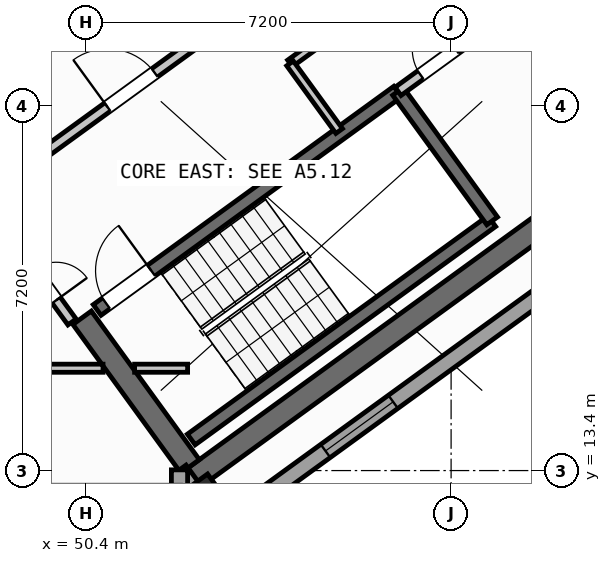
"""IFC4 building model, lengths in metres.
Left out: names, types, materials, properties, quantities, classifications, styles, units other than length and angle.
Written with IfcOpenShell. Run it as: python <this file> out.ifc"""

import sys

from ifc_helpers import new_model, si_unit, direction, frame, frame_2d, origin, origin_2d, place, context, subcontext, project, spatial, rectangle, hollow_rectangle, extrude, source, transform, mapped, element, fill, save


model = new_model("IFC4")
c1 = context("Model", 3, precision=1e-05, world=origin(), true_north=direction((0.0, 1.0)))
c2 = subcontext(c1, "Body", "Model", "MODEL_VIEW")
j1 = project(units=[si_unit("LENGTHUNIT", "METRE"), si_unit("PLANEANGLEUNIT", "RADIAN")], contexts=[c1])
p1 = place(None, origin())
s1 = spatial("IfcSite", under=j1, at=p1, CompositionType="ELEMENT")
p2 = place(p1, origin())
s2 = spatial("IfcBuilding", under=s1, at=p2, CompositionType="ELEMENT")
p3 = place(p2, frame((0.0, 0.0, 222.0)))
s3 = spatial("IfcBuildingStorey", under=s2, at=p3, CompositionType="ELEMENT", Elevation=222.0)
p4 = place(p3, frame((52.399, 13.169, 0.0), z_axis=(0.0, 0.0, 1.0), x_axis=(0.809022352778, 0.587777877013, 0.0)))
e1 = element("IfcWall", 1, at=p4, inside=s3, PredefinedType="SHEAR", context=c2, shape_type="SweptSolid", body=[
    extrude(rectangle(XDim=12.24, YDim=0.45, at=frame_2d((6.12, 0.0))), origin(), (0.0, 0.0, 1.0), 3.35),
])
p5 = place(p3, frame((52.449, 13.483, 0.0), z_axis=(0.0, 0.0, 1.0), x_axis=(-0.587819244441, 0.808992296542, 0.0)))
e2 = element("IfcWall", 2, at=p5, inside=s3, PredefinedType="SHEAR", context=c2, shape_type="SweptSolid", body=[
    extrude(rectangle(XDim=3.625, YDim=0.45, at=frame_2d((1.812, 0.0))), origin(), (0.0, 0.0, 1.0), 3.35),
])
m1 = source(origin(), c2, "Body", "SweptSolid", [
    extrude(hollow_rectangle(XDim=0.8, YDim=0.8, WallThickness=0.032, at=origin_2d()), origin(), (0.0, 0.0, 1.0), 3.6),
])
p6 = place(p3, frame((52.705, 12.773, 0.0), z_axis=(0.0, 0.0, 1.0), x_axis=(0.809016994375, 0.587785252292, 0.0)))
e3 = element("IfcColumn", 3, at=p6, inside=s3, PredefinedType="COLUMN", context=c2, shape_type="MappedRepresentation", body=[
    mapped(m1, transform((0.0, 0.0, 0.0), scale=1.0)),
])
p7 = place(p3, frame((67.454, 22.747, 0.0), z_axis=(0.0, 0.0, 1.0), x_axis=(-0.809021120468, -0.587779573171, 0.0)))
e4 = element("IfcWall", 4, at=p7, inside=s3, PredefinedType="STANDARD", context=c2, shape_type="SweptSolid", body=[
    extrude(rectangle(XDim=17.588, YDim=0.32, at=frame_2d((8.794, 0.0))), origin(), (0.0, 0.0, 1.0), 3.35),
])
p8 = place(p7, frame((1.624, 0.0, 0.0)))
e5 = element("IfcOpeningElement", 5, at=p8, cuts=e4, PredefinedType="OPENING", context=c2, shape_type="SweptSolid", body=[
    extrude(rectangle(XDim=1.05, YDim=2.15, at=frame_2d((0.525, 1.075))), frame((0.0, 0.17, 0.0), z_axis=(0.0, -1.0, 0.0), x_axis=(1.0, 0.0, 0.0)), (0.0, 0.0, 1.0), 0.34),
])
p9 = place(p7, frame((8.344, 0.0, 0.9)))
e6 = element("IfcOpeningElement", 6, at=p9, cuts=e4, PredefinedType="OPENING", context=c2, shape_type="SweptSolid", body=[
    extrude(rectangle(XDim=1.65, YDim=1.45, at=frame_2d((0.825, 0.725))), frame((0.0, 0.17, 0.0), z_axis=(0.0, -1.0, 0.0), x_axis=(1.0, 0.0, 0.0)), (0.0, 0.0, 1.0), 0.34),
])
p10 = place(p7, frame((13.594, 0.0, 0.9)))
e7 = element("IfcOpeningElement", 7, at=p10, cuts=e4, PredefinedType="OPENING", context=c2, shape_type="SweptSolid", body=[
    extrude(rectangle(XDim=1.65, YDim=1.45, at=frame_2d((0.825, 0.725))), frame((0.0, 0.17, 0.0), z_axis=(0.0, -1.0, 0.0), x_axis=(1.0, 0.0, 0.0)), (0.0, 0.0, 1.0), 0.34),
])
p11 = place(p3, frame((52.937, 12.455, 0.0), z_axis=(0.0, 0.0, 1.0), x_axis=(-0.587706324018, 0.809074333241, 0.0)))
e8 = element("IfcWall", 8, at=p11, inside=s3, PredefinedType="STANDARD", context=c2, shape_type="SweptSolid", body=[
    extrude(rectangle(XDim=1.186, YDim=0.32, at=frame_2d((0.593, 0.0))), origin(), (0.0, 0.0, 1.0), 3.35),
])
p12 = place(p3, frame((52.24, 13.414, 0.0), z_axis=(0.0, 0.0, 1.0), x_axis=(0.0, -1.0, 0.0)))
e9 = element("IfcWall", 9, at=p12, inside=s3, PredefinedType="STANDARD", context=c2, shape_type="SweptSolid", body=[
    extrude(rectangle(XDim=9.948, YDim=0.32, at=frame_2d((4.974, 0.0))), origin(), (0.0, 0.0, 1.0), 3.35),
])
p13 = place(p12, frame((2.643, 0.0, 0.9)))
e10 = element("IfcOpeningElement", 10, at=p13, cuts=e9, PredefinedType="OPENING", context=c2, shape_type="SweptSolid", body=[
    extrude(rectangle(XDim=1.65, YDim=1.45, at=frame_2d((0.825, 0.725))), frame((0.0, 0.17, 0.0), z_axis=(0.0, -1.0, 0.0), x_axis=(1.0, 0.0, 0.0)), (0.0, 0.0, 1.0), 0.34),
])
p14 = place(p12, frame((7.408, 0.0, 0.9)))
e11 = element("IfcOpeningElement", 11, at=p14, cuts=e9, PredefinedType="OPENING", context=c2, shape_type="SweptSolid", body=[
    extrude(rectangle(XDim=1.35, YDim=1.45, at=frame_2d((0.675, 0.725))), frame((0.0, 0.17, 0.0), z_axis=(0.0, -1.0, 0.0), x_axis=(1.0, 0.0, 0.0)), (0.0, 0.0, 1.0), 0.34),
])
p15 = place(p3, frame((52.472, 14.013, 0.0), z_axis=(0.0, 0.0, 1.0), x_axis=(0.809028366311, 0.587769599847, 0.0)))
e12 = element("IfcWall", 12, at=p15, inside=s3, PredefinedType="SHEAR", context=c2, shape_type="SweptSolid", body=[
    extrude(rectangle(XDim=7.33, YDim=0.26, at=frame_2d((3.665, 0.0))), origin(), (0.0, 0.0, 1.0), 3.35),
])
p16 = place(p3, frame((50.615, 16.57, 0.0), z_axis=(0.0, 0.0, 1.0), x_axis=(0.809028366311, 0.587769599847, 0.0)))
e13 = element("IfcWall", 13, at=p16, inside=s3, PredefinedType="SHEAR", context=c2, shape_type="SweptSolid", body=[
    extrude(rectangle(XDim=7.33, YDim=0.26, at=frame_2d((3.665, 0.0))), origin(), (0.0, 0.0, 1.0), 3.35),
])
p17 = place(p16, frame((0.22, 0.0, 0.0)))
e14 = element("IfcOpeningElement", 14, at=p17, cuts=e13, PredefinedType="OPENING", context=c2, shape_type="SweptSolid", body=[
    extrude(rectangle(XDim=1.1, YDim=2.1, at=frame_2d((0.55, 1.05))), frame((0.0, 0.14, 0.0), z_axis=(0.0, -1.0, 0.0), x_axis=(1.0, 0.0, 0.0)), (0.0, 0.0, 1.0), 0.28),
])
p18 = place(p3, frame((58.41, 18.327, 0.0), z_axis=(0.0, 0.0, 1.0), x_axis=(-0.58776738483, 0.809029975545, 0.0)))
e15 = element("IfcWall", 15, at=p18, inside=s3, PredefinedType="SHEAR", context=c2, shape_type="SweptSolid", body=[
    extrude(rectangle(XDim=3.16, YDim=0.26, at=frame_2d((1.58, 0.0))), origin(), (0.0, 0.0, 1.0), 3.35),
])
p19 = place(p3, frame((47.025, 21.378, 0.0), z_axis=(0.0, 0.0, 1.0), x_axis=(0.809052869724, 0.587735870941, 0.0)))
e16 = element("IfcWall", 16, at=p19, inside=s3, PredefinedType="STANDARD", context=c2, shape_type="SweptSolid", body=[
    extrude(rectangle(XDim=3.498, YDim=0.2, at=frame_2d((1.749, 0.0))), origin(), (0.0, 0.0, 1.0), 3.34),
])
p20 = place(p19, frame((0.508, 0.0, 0.0)))
e17 = element("IfcOpeningElement", 17, at=p20, cuts=e16, PredefinedType="OPENING", context=c2, shape_type="SweptSolid", body=[
    extrude(rectangle(XDim=1.3, YDim=2.2, at=frame_2d((0.65, 1.1))), frame((0.0, 0.11, 0.0), z_axis=(0.0, -1.0, 0.0), x_axis=(1.0, 0.0, 0.0)), (0.0, 0.0, 1.0), 0.22),
])
p21 = place(p3, frame((48.718, 19.048, 0.0), z_axis=(0.0, 0.0, 1.0), x_axis=(0.809017261719, 0.587784884325, 0.0)))
e18 = element("IfcWall", 18, at=p21, inside=s3, PredefinedType="STANDARD", context=c2, shape_type="SweptSolid", body=[
    extrude(rectangle(XDim=5.818, YDim=0.2, at=frame_2d((2.909, 0.0))), origin(), (0.0, 0.0, 1.0), 3.34),
])
p22 = place(p21, frame((2.598, 0.0, 0.0)))
e19 = element("IfcOpeningElement", 19, at=p22, cuts=e18, PredefinedType="OPENING", context=c2, shape_type="SweptSolid", body=[
    extrude(rectangle(XDim=1.15, YDim=2.1, at=frame_2d((0.575, 1.05))), frame((0.0, 0.11, 0.0), z_axis=(0.0, -1.0, 0.0), x_axis=(1.0, 0.0, 0.0)), (0.0, 0.0, 1.0), 0.22),
])
p23 = place(p3, frame((56.553, 20.884, 0.0), z_axis=(0.0, 0.0, 1.0), x_axis=(0.809041669066, 0.587751288995, 0.0)))
e20 = element("IfcWall", 20, at=p23, inside=s3, PredefinedType="STANDARD", context=c2, shape_type="SweptSolid", body=[
    extrude(rectangle(XDim=3.868, YDim=0.2, at=frame_2d((1.934, 0.0))), origin(), (0.0, 0.0, 1.0), 3.34),
])
p24 = place(p23, frame((0.55, 0.0, 0.0)))
e21 = element("IfcOpeningElement", 21, at=p24, cuts=e20, PredefinedType="OPENING", context=c2, shape_type="SweptSolid", body=[
    extrude(rectangle(XDim=0.86, YDim=2.05, at=frame_2d((0.43, 1.025))), frame((0.0, 0.11, 0.0), z_axis=(0.0, -1.0, 0.0), x_axis=(1.0, 0.0, 0.0)), (0.0, 0.0, 1.0), 0.22),
])
p25 = place(p3, frame((54.421, 21.436, 0.0), z_axis=(0.0, 0.0, 1.0), x_axis=(0.809013710463, 0.587789772183, 0.0)))
e22 = element("IfcWall", 22, at=p25, inside=s3, PredefinedType="PARTITIONING", context=c2, shape_type="SweptSolid", body=[
    extrude(rectangle(XDim=5.36, YDim=0.16, at=frame_2d((2.68, 0.0))), origin(), (0.0, 0.0, 1.0), 3.34),
])
p26 = place(p25, frame((1.4, 0.0, 0.0)))
e23 = element("IfcOpeningElement", 23, at=p26, cuts=e22, PredefinedType="OPENING", context=c2, shape_type="SweptSolid", body=[
    extrude(rectangle(XDim=0.86, YDim=2.05, at=frame_2d((0.43, 1.025))), frame((0.0, 0.09, 0.0), z_axis=(0.0, -1.0, 0.0), x_axis=(1.0, 0.0, 0.0)), (0.0, 0.0, 1.0), 0.18),
])
p27 = place(p3, frame((55.391, 20.102, 0.0), z_axis=(0.0, 0.0, 1.0), x_axis=(-0.58778447739, 0.809017557374, 0.0)))
e24 = element("IfcWall", 24, at=p27, inside=s3, PredefinedType="PARTITIONING", context=c2, shape_type="SweptSolid", body=[
    extrude(rectangle(XDim=1.65, YDim=0.16, at=frame_2d((0.825, 0.0))), origin(), (0.0, 0.0, 1.0), 3.34),
])
p28 = place(p3, frame((35.178, 15.42, 0.0), z_axis=(0.0, 0.0, 1.0), x_axis=(1.0, 0.0, 0.0)))
e25 = element("IfcWall", 25, at=p28, inside=s3, PredefinedType="PARTITIONING", context=c2, shape_type="SweptSolid", body=[
    extrude(rectangle(XDim=15.552, YDim=0.16, at=frame_2d((7.776, 0.0))), origin(), (0.0, 0.0, 1.0), 3.34),
])
p29 = place(p28, frame((0.733, 0.0, 0.0)))
e26 = element("IfcOpeningElement", 26, at=p29, cuts=e25, PredefinedType="OPENING", context=c2, shape_type="SweptSolid", body=[
    extrude(rectangle(XDim=1.0, YDim=2.1, at=frame_2d((0.5, 1.05))), frame((0.0, 0.09, 0.0), z_axis=(0.0, -1.0, 0.0), x_axis=(1.0, 0.0, 0.0)), (0.0, 0.0, 1.0), 0.18),
])
p30 = place(p28, frame((9.153, 0.0, 0.0)))
e27 = element("IfcOpeningElement", 27, at=p30, cuts=e25, PredefinedType="OPENING", context=c2, shape_type="SweptSolid", body=[
    extrude(rectangle(XDim=1.0, YDim=2.1, at=frame_2d((0.5, 1.05))), frame((0.0, 0.09, 0.0), z_axis=(0.0, -1.0, 0.0), x_axis=(1.0, 0.0, 0.0)), (0.0, 0.0, 1.0), 0.18),
])
p31 = place(p3, frame((51.354, 15.42, 0.0), z_axis=(0.0, 0.0, 1.0), x_axis=(1.0, 0.0, 0.0)))
e28 = element("IfcWall", 28, at=p31, inside=s3, PredefinedType="PARTITIONING", context=c2, shape_type="SweptSolid", body=[
    extrude(rectangle(XDim=1.046, YDim=0.16, at=frame_2d((0.523, 0.0))), origin(), (0.0, 0.0, 1.0), 3.34),
])
p32 = place(p3, frame((50.119, 16.333, 0.0), z_axis=(0.0, 0.0, 1.0), x_axis=(-0.587749856981, 0.809042709391, 0.0)))
e29 = element("IfcWall", 29, at=p32, inside=s3, PredefinedType="STANDARD", context=c2, shape_type="SweptSolid", body=[
    extrude(rectangle(XDim=2.96, YDim=0.2, at=frame_2d((1.48, 0.0))), origin(), (0.0, 0.0, 1.0), 3.34),
])
p33 = place(p32, frame((0.53, 0.0, 0.0)))
e30 = element("IfcOpeningElement", 30, at=p33, cuts=e29, PredefinedType="OPENING", context=c2, shape_type="SweptSolid", body=[
    extrude(rectangle(XDim=1.5, YDim=2.15, at=frame_2d((0.75, 1.075))), frame((0.0, 0.11, 0.0), z_axis=(0.0, -1.0, 0.0), x_axis=(1.0, 0.0, 0.0)), (0.0, 0.0, 1.0), 0.22),
])
p34 = place(p3, frame((64.709, 20.938, 0.0), z_axis=(0.0, 0.0, 1.0), x_axis=(-0.587781191743, 0.809019944521, 0.0)))
e31 = element("IfcWall", 31, at=p34, inside=s3, PredefinedType="PARTITIONING", context=c2, shape_type="SweptSolid", body=[
    extrude(rectangle(XDim=11.6, YDim=0.16, at=frame_2d((5.8, 0.0))), origin(), (0.0, 0.0, 1.0), 3.34),
])
m2 = source(origin(), c2, "Body", "SweptSolid", [
    extrude(rectangle(XDim=1.65, YDim=1.45, at=frame_2d((0.825, 0.725))), frame((0.0, 0.03, 0.0), z_axis=(0.0, -1.0, 0.0), x_axis=(1.0, 0.0, 0.0)), (0.0, 0.0, 1.0), 0.06),
])
p35 = place(p10, origin())
e32 = element("IfcWindow", 32, at=p35, inside=s3, PartitioningType="SINGLE_PANEL", PredefinedType="WINDOW", context=c2, shape_type="MappedRepresentation", body=[
    mapped(m2, transform((0.0, 0.0, 0.0), scale=1.0)),
])
fill(e7, e32)
m3 = source(origin(), c2, "Body", "SweptSolid", [
    extrude(rectangle(XDim=1.1, YDim=2.1, at=frame_2d((0.55, 1.05))), frame((0.0, 0.025, 0.0), z_axis=(0.0, -1.0, 0.0), x_axis=(1.0, 0.0, 0.0)), (0.0, 0.0, 1.0), 0.05),
])
p36 = place(p17, origin())
e33 = element("IfcDoor", 33, at=p36, inside=s3, OperationType="SINGLE_SWING_RIGHT", PredefinedType="DOOR", context=c2, shape_type="MappedRepresentation", body=[
    mapped(m3, transform((0.0, 0.0, 0.0), scale=1.0)),
])
fill(e14, e33)
m4 = source(origin(), c2, "Body", "SweptSolid", [
    extrude(rectangle(XDim=1.15, YDim=2.1, at=frame_2d((0.575, 1.05))), frame((0.0, 0.025, 0.0), z_axis=(0.0, -1.0, 0.0), x_axis=(1.0, 0.0, 0.0)), (0.0, 0.0, 1.0), 0.05),
])
p37 = place(p22, origin())
e34 = element("IfcDoor", 34, at=p37, inside=s3, OperationType="SINGLE_SWING_LEFT", PredefinedType="DOOR", context=c2, shape_type="MappedRepresentation", body=[
    mapped(m4, transform((0.0, 0.0, 0.0), scale=1.0)),
])
fill(e19, e34)
m5 = source(origin(), c2, "Body", "SweptSolid", [
    extrude(rectangle(XDim=0.86, YDim=2.05, at=frame_2d((0.43, 1.025))), frame((0.0, 0.025, 0.0), z_axis=(0.0, -1.0, 0.0), x_axis=(1.0, 0.0, 0.0)), (0.0, 0.0, 1.0), 0.05),
])
p38 = place(p24, origin())
e35 = element("IfcDoor", 35, at=p38, inside=s3, OperationType="SINGLE_SWING_RIGHT", PredefinedType="DOOR", context=c2, shape_type="MappedRepresentation", body=[
    mapped(m5, transform((0.0, 0.0, 0.0), scale=1.0)),
])
fill(e21, e35)
m6 = source(origin(), c2, "Body", "SweptSolid", [
    extrude(rectangle(XDim=1.5, YDim=2.15, at=frame_2d((0.75, 1.075))), frame((0.0, 0.025, 0.0), z_axis=(0.0, -1.0, 0.0), x_axis=(1.0, 0.0, 0.0)), (0.0, 0.0, 1.0), 0.05),
])
p39 = place(p33, frame((1.5, 0.0, 0.0), z_axis=(0.0, 0.0, 1.0), x_axis=(-1.0, 0.0, 0.0)))
e36 = element("IfcDoor", 36, at=p39, inside=s3, OperationType="DOUBLE_DOOR_SINGLE_SWING", PredefinedType="DOOR", context=c2, shape_type="MappedRepresentation", body=[
    mapped(m6, transform((0.0, 0.0, 0.0), scale=1.0)),
])
fill(e30, e36)
save(model, sys.argv[1])
